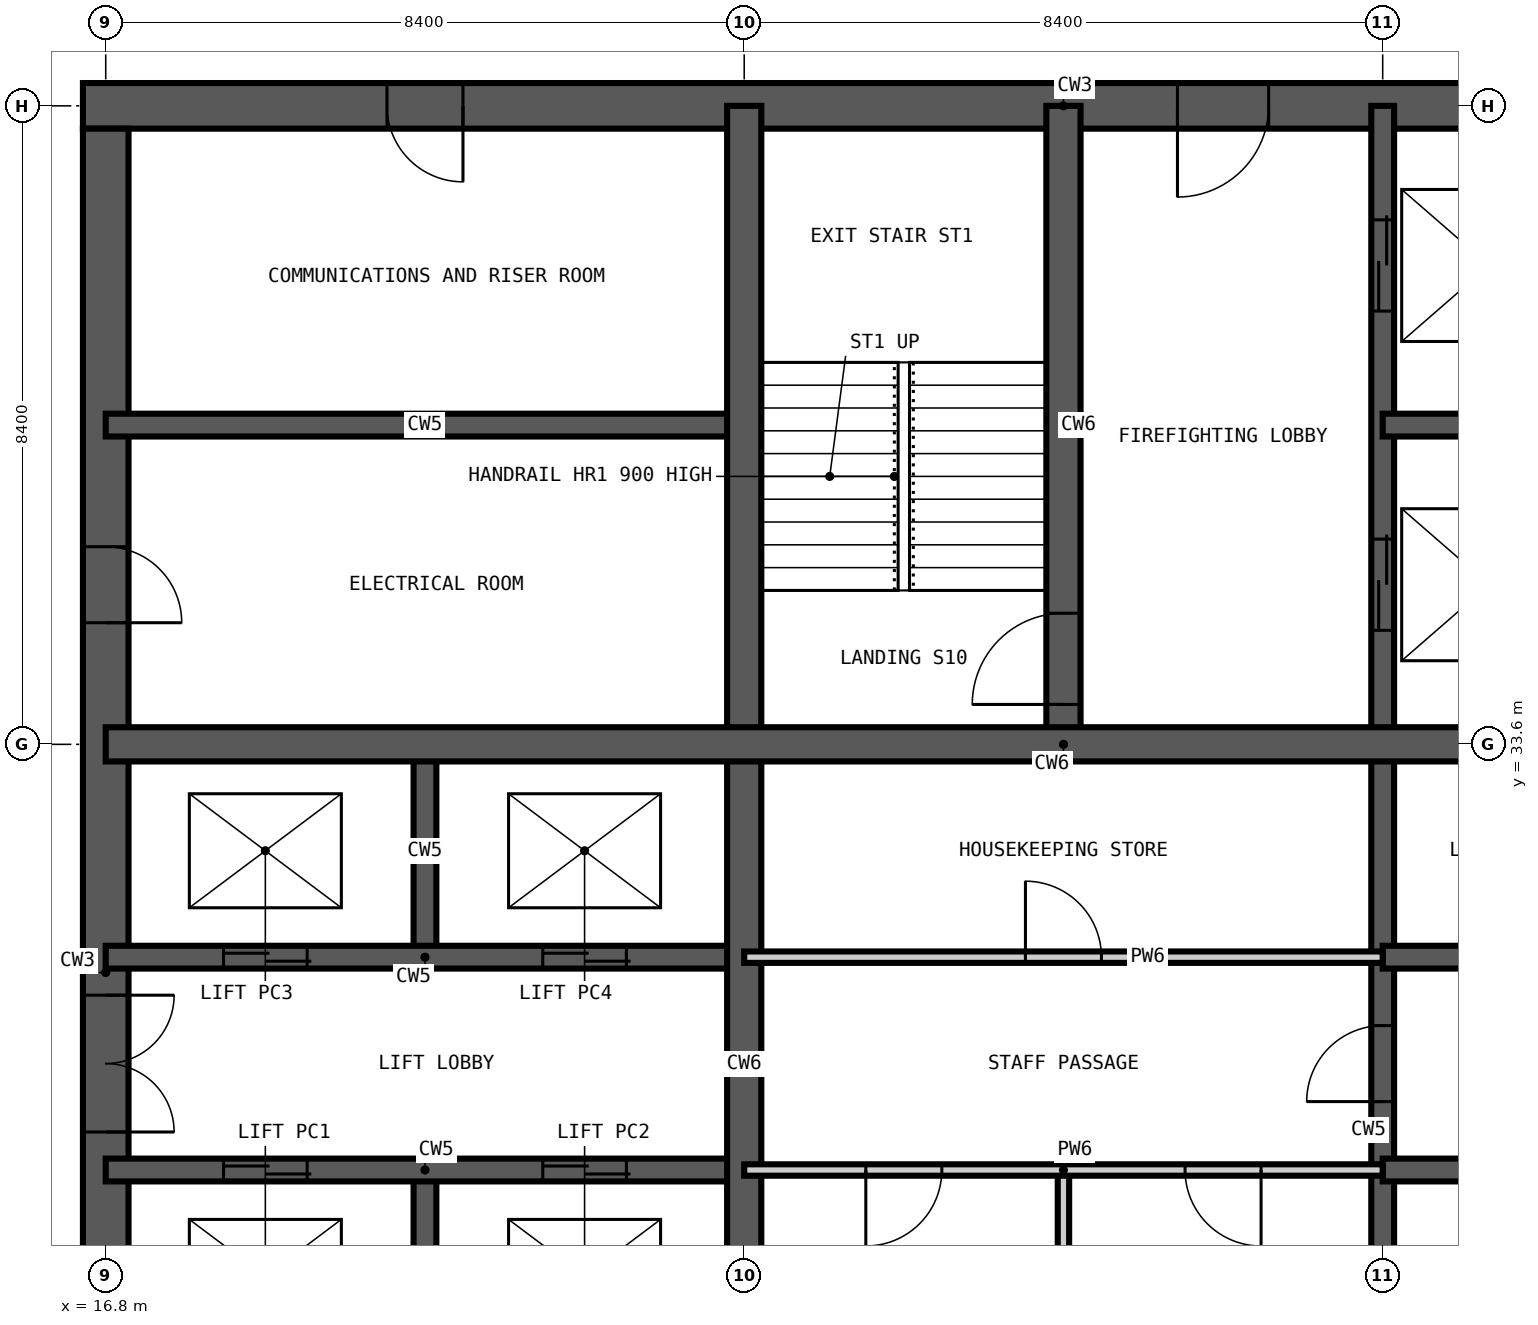
"""IFC4 building model, lengths in metres.
Left out: names, types, materials, properties, quantities, classifications, styles, units other than length and angle.
Written with IfcOpenShell. Run it as: python <this file> out.ifc"""

import sys

from ifc_helpers import new_model, si_unit, direction, frame, frame_2d, origin, place, context, subcontext, project, spatial, rectangle, extrude, element, fill, save


model = new_model("IFC4")
c1 = context("Model", 3, precision=1e-05, world=origin(), true_north=direction((0.0, 1.0)))
c2 = subcontext(c1, "Body", "Model", "MODEL_VIEW")
j1 = project(units=[si_unit("LENGTHUNIT", "METRE"), si_unit("PLANEANGLEUNIT", "RADIAN")], contexts=[c1])
p1 = place(None, origin())
s1 = spatial("IfcSite", under=j1, at=p1, CompositionType="ELEMENT")
p2 = place(p1, origin())
s2 = spatial("IfcBuilding", under=s1, at=p2, CompositionType="ELEMENT")
p3 = place(p2, frame((0.0, 0.0, 180.6)))
s3 = spatial("IfcBuildingStorey", under=s2, at=p3, CompositionType="ELEMENT", Elevation=180.6)
p4 = place(p3, frame((42.3, 42.0, -0.35), z_axis=(0.0, 0.0, 1.0), x_axis=(-1.0, 0.0, 0.0)))
e1 = element("IfcWall", 1, at=p4, inside=s3, PredefinedType="SHEAR", context=c2, shape_type="SweptSolid", body=[
    extrude(rectangle(XDim=25.8, YDim=0.6, at=frame_2d((12.9, 0.0))), origin(), (0.0, 0.0, 1.0), 3.6),
])
p5 = place(p4, frame((20.8, 0.0, 0.35)))
e2 = element("IfcOpeningElement", 2, at=p5, cuts=e1, PredefinedType="OPENING", context=c2, shape_type="SweptSolid", body=[
    extrude(rectangle(XDim=1.0, YDim=2.1, at=frame_2d((0.5, 1.05))), frame((0.0, 0.31, 0.0), z_axis=(0.0, -1.0, 0.0), x_axis=(1.0, 0.0, 0.0)), (0.0, 0.0, 1.0), 0.62),
])
p6 = place(p4, frame((10.2, 0.0, 0.35)))
e3 = element("IfcOpeningElement", 3, at=p6, cuts=e1, PredefinedType="OPENING", context=c2, shape_type="SweptSolid", body=[
    extrude(rectangle(XDim=1.2, YDim=2.2, at=frame_2d((0.6, 1.1))), frame((0.0, 0.31, 0.0), z_axis=(0.0, -1.0, 0.0), x_axis=(1.0, 0.0, 0.0)), (0.0, 0.0, 1.0), 0.62),
])
p7 = place(p3, frame((16.8, 41.7, -0.35), z_axis=(0.0, 0.0, 1.0), x_axis=(0.0, -1.0, 0.0)))
e4 = element("IfcWall", 4, at=p7, inside=s3, PredefinedType="SHEAR", context=c2, shape_type="SweptSolid", body=[
    extrude(rectangle(XDim=24.6, YDim=0.6, at=frame_2d((12.3, 0.0))), origin(), (0.0, 0.0, 1.0), 3.6),
])
p8 = place(p7, frame((11.4, 0.0, 0.35)))
e5 = element("IfcOpeningElement", 5, at=p8, cuts=e4, PredefinedType="OPENING", context=c2, shape_type="SweptSolid", body=[
    extrude(rectangle(XDim=1.8, YDim=2.2, at=frame_2d((0.9, 1.1))), frame((0.0, 0.31, 0.0), z_axis=(0.0, -1.0, 0.0), x_axis=(1.0, 0.0, 0.0)), (0.0, 0.0, 1.0), 0.62),
])
p9 = place(p7, frame((20.2, 0.0, 0.35)))
e6 = element("IfcOpeningElement", 6, at=p9, cuts=e4, PredefinedType="OPENING", context=c2, shape_type="SweptSolid", body=[
    extrude(rectangle(XDim=1.0, YDim=2.1, at=frame_2d((0.5, 1.05))), frame((0.0, 0.31, 0.0), z_axis=(0.0, -1.0, 0.0), x_axis=(1.0, 0.0, 0.0)), (0.0, 0.0, 1.0), 0.62),
])
p10 = place(p7, frame((5.5, 0.0, 0.35)))
e7 = element("IfcOpeningElement", 7, at=p10, cuts=e4, PredefinedType="OPENING", context=c2, shape_type="SweptSolid", body=[
    extrude(rectangle(XDim=1.0, YDim=2.1, at=frame_2d((0.5, 1.05))), frame((0.0, 0.31, 0.0), z_axis=(0.0, -1.0, 0.0), x_axis=(1.0, 0.0, 0.0)), (0.0, 0.0, 1.0), 0.62),
])
p11 = place(p3, frame((21.0, 22.4, -0.35), z_axis=(0.0, 0.0, 1.0), x_axis=(0.0, 1.0, 0.0)))
e8 = element("IfcWall", 8, at=p11, inside=s3, PredefinedType="SHEAR", context=c2, shape_type="SweptSolid", body=[
    extrude(rectangle(XDim=5.6, YDim=0.3, at=frame_2d((2.8, 0.0))), origin(), (0.0, 0.0, 1.0), 3.6),
])
p12 = place(p3, frame((21.0, 30.8, -0.35), z_axis=(0.0, 0.0, 1.0), x_axis=(0.0, 1.0, 0.0)))
e9 = element("IfcWall", 9, at=p12, inside=s3, PredefinedType="SHEAR", context=c2, shape_type="SweptSolid", body=[
    extrude(rectangle(XDim=2.8, YDim=0.3, at=frame_2d((1.4, 0.0))), origin(), (0.0, 0.0, 1.0), 3.6),
])
p13 = place(p3, frame((33.6, 16.8, -0.35), z_axis=(0.0, 0.0, 1.0), x_axis=(0.0, 1.0, 0.0)))
e10 = element("IfcWall", 10, at=p13, inside=s3, PredefinedType="SHEAR", context=c2, shape_type="SweptSolid", body=[
    extrude(rectangle(XDim=25.2, YDim=0.3, at=frame_2d((12.6, 0.0))), origin(), (0.0, 0.0, 1.0), 3.6),
])
p14 = place(p13, frame((22.5, 0.0, 0.35)))
e11 = element("IfcOpeningElement", 11, at=p14, cuts=e10, PredefinedType="OPENING", context=c2, shape_type="SweptSolid", body=[
    extrude(rectangle(XDim=1.2, YDim=2.2, at=frame_2d((0.6, 1.1))), frame((0.0, 0.16, 0.0), z_axis=(0.0, -1.0, 0.0), x_axis=(1.0, 0.0, 0.0)), (0.0, 0.0, 1.0), 0.32),
])
p15 = place(p13, frame((18.3, 0.0, 0.35)))
e12 = element("IfcOpeningElement", 12, at=p15, cuts=e10, PredefinedType="OPENING", context=c2, shape_type="SweptSolid", body=[
    extrude(rectangle(XDim=1.2, YDim=2.2, at=frame_2d((0.6, 1.1))), frame((0.0, 0.16, 0.0), z_axis=(0.0, -1.0, 0.0), x_axis=(1.0, 0.0, 0.0)), (0.0, 0.0, 1.0), 0.32),
])
p16 = place(p13, frame((12.1, 0.0, 0.35)))
e13 = element("IfcOpeningElement", 13, at=p16, cuts=e10, PredefinedType="OPENING", context=c2, shape_type="SweptSolid", body=[
    extrude(rectangle(XDim=1.0, YDim=2.1, at=frame_2d((0.5, 1.05))), frame((0.0, 0.16, 0.0), z_axis=(0.0, -1.0, 0.0), x_axis=(1.0, 0.0, 0.0)), (0.0, 0.0, 1.0), 0.32),
])
p17 = place(p3, frame((16.8, 28.0, -0.35), z_axis=(0.0, 0.0, 1.0), x_axis=(1.0, 0.0, 0.0)))
e14 = element("IfcWall", 14, at=p17, inside=s3, PredefinedType="SHEAR", context=c2, shape_type="SweptSolid", body=[
    extrude(rectangle(XDim=8.4, YDim=0.3, at=frame_2d((4.2, 0.0))), origin(), (0.0, 0.0, 1.0), 3.6),
])
p18 = place(p17, frame((1.55, 0.0, 0.35)))
e15 = element("IfcOpeningElement", 15, at=p18, cuts=e14, PredefinedType="OPENING", context=c2, shape_type="SweptSolid", body=[
    extrude(rectangle(XDim=1.1, YDim=2.2, at=frame_2d((0.55, 1.1))), frame((0.0, 0.16, 0.0), z_axis=(0.0, -1.0, 0.0), x_axis=(1.0, 0.0, 0.0)), (0.0, 0.0, 1.0), 0.32),
])
p19 = place(p17, frame((5.75, 0.0, 0.35)))
e16 = element("IfcOpeningElement", 16, at=p19, cuts=e14, PredefinedType="OPENING", context=c2, shape_type="SweptSolid", body=[
    extrude(rectangle(XDim=1.1, YDim=2.2, at=frame_2d((0.55, 1.1))), frame((0.0, 0.16, 0.0), z_axis=(0.0, -1.0, 0.0), x_axis=(1.0, 0.0, 0.0)), (0.0, 0.0, 1.0), 0.32),
])
p20 = place(p3, frame((33.6, 28.0, -0.35), z_axis=(0.0, 0.0, 1.0), x_axis=(1.0, 0.0, 0.0)))
e17 = element("IfcWall", 17, at=p20, inside=s3, PredefinedType="SHEAR", context=c2, shape_type="SweptSolid", body=[
    extrude(rectangle(XDim=8.4, YDim=0.3, at=frame_2d((4.2, 0.0))), origin(), (0.0, 0.0, 1.0), 3.6),
])
p21 = place(p20, frame((1.6, 0.0, 0.35)))
e18 = element("IfcOpeningElement", 18, at=p21, cuts=e17, PredefinedType="OPENING", context=c2, shape_type="SweptSolid", body=[
    extrude(rectangle(XDim=1.0, YDim=2.1, at=frame_2d((0.5, 1.05))), frame((0.0, 0.16, 0.0), z_axis=(0.0, -1.0, 0.0), x_axis=(1.0, 0.0, 0.0)), (0.0, 0.0, 1.0), 0.32),
])
p22 = place(p20, frame((4.6, 0.0, 0.35)))
e19 = element("IfcOpeningElement", 19, at=p22, cuts=e17, PredefinedType="OPENING", context=c2, shape_type="SweptSolid", body=[
    extrude(rectangle(XDim=1.0, YDim=2.1, at=frame_2d((0.5, 1.05))), frame((0.0, 0.16, 0.0), z_axis=(0.0, -1.0, 0.0), x_axis=(1.0, 0.0, 0.0)), (0.0, 0.0, 1.0), 0.32),
])
p23 = place(p3, frame((16.8, 30.8, -0.35), z_axis=(0.0, 0.0, 1.0), x_axis=(1.0, 0.0, 0.0)))
e20 = element("IfcWall", 20, at=p23, inside=s3, PredefinedType="SHEAR", context=c2, shape_type="SweptSolid", body=[
    extrude(rectangle(XDim=8.4, YDim=0.3, at=frame_2d((4.2, 0.0))), origin(), (0.0, 0.0, 1.0), 3.6),
])
p24 = place(p23, frame((1.55, 0.0, 0.35)))
e21 = element("IfcOpeningElement", 21, at=p24, cuts=e20, PredefinedType="OPENING", context=c2, shape_type="SweptSolid", body=[
    extrude(rectangle(XDim=1.1, YDim=2.2, at=frame_2d((0.55, 1.1))), frame((0.0, 0.16, 0.0), z_axis=(0.0, -1.0, 0.0), x_axis=(1.0, 0.0, 0.0)), (0.0, 0.0, 1.0), 0.32),
])
p25 = place(p23, frame((5.75, 0.0, 0.35)))
e22 = element("IfcOpeningElement", 22, at=p25, cuts=e20, PredefinedType="OPENING", context=c2, shape_type="SweptSolid", body=[
    extrude(rectangle(XDim=1.1, YDim=2.2, at=frame_2d((0.55, 1.1))), frame((0.0, 0.16, 0.0), z_axis=(0.0, -1.0, 0.0), x_axis=(1.0, 0.0, 0.0)), (0.0, 0.0, 1.0), 0.32),
])
for number, where, z_axis, x_axis in (
    (23, (33.6, 30.8, -0.35), (0.0, 0.0, 1.0), (1.0, 0.0, 0.0)),
    (24, (16.8, 37.8, -0.35), (0.0, 0.0, 1.0), (1.0, 0.0, 0.0)),
):
    element("IfcWall", number, at=place(p3, frame(where, z_axis=z_axis, x_axis=x_axis)), inside=s3, PredefinedType="SHEAR", context=c2, shape_type="SweptSolid", body=[
        extrude(rectangle(XDim=8.4, YDim=0.3, at=frame_2d((4.2, 0.0))), origin(), (0.0, 0.0, 1.0), 3.6),
    ])
p26 = place(p3, frame((33.6, 37.8, -0.35), z_axis=(0.0, 0.0, 1.0), x_axis=(1.0, 0.0, 0.0)))
e25 = element("IfcWall", 25, at=p26, inside=s3, PredefinedType="SHEAR", context=c2, shape_type="SweptSolid", body=[
    extrude(rectangle(XDim=2.8, YDim=0.3, at=frame_2d((1.4, 0.0))), origin(), (0.0, 0.0, 1.0), 3.6),
])
p27 = place(p3, frame((25.2, 16.8, -0.35), z_axis=(0.0, 0.0, 1.0), x_axis=(0.0, 1.0, 0.0)))
e26 = element("IfcWall", 26, at=p27, inside=s3, PredefinedType="SHEAR", context=c2, shape_type="SweptSolid", body=[
    extrude(rectangle(XDim=25.2, YDim=0.45, at=frame_2d((12.6, 0.0))), origin(), (0.0, 0.0, 1.0), 3.6),
])
p28 = place(p3, frame((29.4, 33.6, -0.35), z_axis=(0.0, 0.0, 1.0), x_axis=(0.0, 1.0, 0.0)))
e27 = element("IfcWall", 27, at=p28, inside=s3, PredefinedType="SHEAR", context=c2, shape_type="SweptSolid", body=[
    extrude(rectangle(XDim=8.4, YDim=0.45, at=frame_2d((4.2, 0.0))), origin(), (0.0, 0.0, 1.0), 3.6),
])
p29 = place(p28, frame((0.525, 0.0, 0.35)))
e28 = element("IfcOpeningElement", 28, at=p29, cuts=e27, PredefinedType="OPENING", context=c2, shape_type="SweptSolid", body=[
    extrude(rectangle(XDim=1.2, YDim=2.2, at=frame_2d((0.6, 1.1))), frame((0.0, 0.235, 0.0), z_axis=(0.0, -1.0, 0.0), x_axis=(1.0, 0.0, 0.0)), (0.0, 0.0, 1.0), 0.47),
])
p30 = place(p3, frame((16.8, 33.6, -0.35), z_axis=(0.0, 0.0, 1.0), x_axis=(1.0, 0.0, 0.0)))
e29 = element("IfcWall", 29, at=p30, inside=s3, PredefinedType="SHEAR", context=c2, shape_type="SweptSolid", body=[
    extrude(rectangle(XDim=25.2, YDim=0.45, at=frame_2d((12.6, 0.0))), origin(), (0.0, 0.0, 1.0), 3.6),
])
p31 = place(p3, frame((29.4, 25.2, 0.0), z_axis=(0.0, 0.0, 1.0), x_axis=(0.0, 1.0, 0.0)))
e30 = element("IfcWall", 30, at=p31, inside=s3, PredefinedType="PARTITIONING", context=c2, shape_type="SweptSolid", body=[
    extrude(rectangle(XDim=2.8, YDim=0.15, at=frame_2d((1.4, 0.0))), origin(), (0.0, 0.0, 1.0), 3.25),
])
p32 = place(p3, frame((25.2, 28.0, 0.0), z_axis=(0.0, 0.0, 1.0), x_axis=(1.0, 0.0, 0.0)))
e31 = element("IfcWall", 31, at=p32, inside=s3, PredefinedType="PARTITIONING", context=c2, shape_type="SweptSolid", body=[
    extrude(rectangle(XDim=8.4, YDim=0.15, at=frame_2d((4.2, 0.0))), origin(), (0.0, 0.0, 1.0), 3.25),
])
p33 = place(p32, frame((5.8, 0.0, 0.0)))
e32 = element("IfcOpeningElement", 32, at=p33, cuts=e31, PredefinedType="OPENING", context=c2, shape_type="SweptSolid", body=[
    extrude(rectangle(XDim=1.0, YDim=2.1, at=frame_2d((0.5, 1.05))), frame((0.0, 0.085, 0.0), z_axis=(0.0, -1.0, 0.0), x_axis=(1.0, 0.0, 0.0)), (0.0, 0.0, 1.0), 0.17),
])
p34 = place(p32, frame((1.6, 0.0, 0.0)))
e33 = element("IfcOpeningElement", 33, at=p34, cuts=e31, PredefinedType="OPENING", context=c2, shape_type="SweptSolid", body=[
    extrude(rectangle(XDim=1.0, YDim=2.1, at=frame_2d((0.5, 1.05))), frame((0.0, 0.085, 0.0), z_axis=(0.0, -1.0, 0.0), x_axis=(1.0, 0.0, 0.0)), (0.0, 0.0, 1.0), 0.17),
])
p35 = place(p3, frame((25.2, 30.8, 0.0), z_axis=(0.0, 0.0, 1.0), x_axis=(1.0, 0.0, 0.0)))
e34 = element("IfcWall", 34, at=p35, inside=s3, PredefinedType="PARTITIONING", context=c2, shape_type="SweptSolid", body=[
    extrude(rectangle(XDim=8.4, YDim=0.15, at=frame_2d((4.2, 0.0))), origin(), (0.0, 0.0, 1.0), 3.25),
])
p36 = place(p35, frame((3.7, 0.0, 0.0)))
e35 = element("IfcOpeningElement", 35, at=p36, cuts=e34, PredefinedType="OPENING", context=c2, shape_type="SweptSolid", body=[
    extrude(rectangle(XDim=1.0, YDim=2.1, at=frame_2d((0.5, 1.05))), frame((0.0, 0.085, 0.0), z_axis=(0.0, -1.0, 0.0), x_axis=(1.0, 0.0, 0.0)), (0.0, 0.0, 1.0), 0.17),
])
p37 = place(p29, origin())
e36 = element("IfcDoor", 36, at=p37, inside=s3, OperationType="SINGLE_SWING_LEFT", PredefinedType="DOOR", context=c2, shape_type="SweptSolid", body=[
    extrude(rectangle(XDim=1.2, YDim=2.2, at=frame_2d((0.6, 1.1))), frame((0.0, 0.025, 0.0), z_axis=(0.0, -1.0, 0.0), x_axis=(1.0, 0.0, 0.0)), (0.0, 0.0, 1.0), 0.05),
])
fill(e28, e36)
p38 = place(p18, origin())
e37 = element("IfcDoor", 37, at=p38, inside=s3, OperationType="DOUBLE_DOOR_SLIDING", PredefinedType="DOOR", context=c2, shape_type="SweptSolid", body=[
    extrude(rectangle(XDim=1.1, YDim=2.2, at=frame_2d((0.55, 1.1))), frame((0.0, 0.025, 0.0), z_axis=(0.0, -1.0, 0.0), x_axis=(1.0, 0.0, 0.0)), (0.0, 0.0, 1.0), 0.05),
])
fill(e15, e37)
p39 = place(p19, origin())
e38 = element("IfcDoor", 38, at=p39, inside=s3, OperationType="DOUBLE_DOOR_SLIDING", PredefinedType="DOOR", context=c2, shape_type="SweptSolid", body=[
    extrude(rectangle(XDim=1.1, YDim=2.2, at=frame_2d((0.55, 1.1))), frame((0.0, 0.025, 0.0), z_axis=(0.0, -1.0, 0.0), x_axis=(1.0, 0.0, 0.0)), (0.0, 0.0, 1.0), 0.05),
])
fill(e16, e38)
p40 = place(p24, origin())
e39 = element("IfcDoor", 39, at=p40, inside=s3, OperationType="DOUBLE_DOOR_SLIDING", PredefinedType="DOOR", context=c2, shape_type="SweptSolid", body=[
    extrude(rectangle(XDim=1.1, YDim=2.2, at=frame_2d((0.55, 1.1))), frame((0.0, 0.025, 0.0), z_axis=(0.0, -1.0, 0.0), x_axis=(1.0, 0.0, 0.0)), (0.0, 0.0, 1.0), 0.05),
])
fill(e21, e39)
p41 = place(p25, origin())
e40 = element("IfcDoor", 40, at=p41, inside=s3, OperationType="DOUBLE_DOOR_SLIDING", PredefinedType="DOOR", context=c2, shape_type="SweptSolid", body=[
    extrude(rectangle(XDim=1.1, YDim=2.2, at=frame_2d((0.55, 1.1))), frame((0.0, 0.025, 0.0), z_axis=(0.0, -1.0, 0.0), x_axis=(1.0, 0.0, 0.0)), (0.0, 0.0, 1.0), 0.05),
])
fill(e22, e40)
p42 = place(p14, origin())
e41 = element("IfcDoor", 41, at=p42, inside=s3, OperationType="DOUBLE_DOOR_SLIDING", PredefinedType="DOOR", context=c2, shape_type="SweptSolid", body=[
    extrude(rectangle(XDim=1.2, YDim=2.2, at=frame_2d((0.6, 1.1))), frame((0.0, 0.025, 0.0), z_axis=(0.0, -1.0, 0.0), x_axis=(1.0, 0.0, 0.0)), (0.0, 0.0, 1.0), 0.05),
])
fill(e11, e41)
p43 = place(p15, origin())
e42 = element("IfcDoor", 42, at=p43, inside=s3, OperationType="DOUBLE_DOOR_SLIDING", PredefinedType="DOOR", context=c2, shape_type="SweptSolid", body=[
    extrude(rectangle(XDim=1.2, YDim=2.2, at=frame_2d((0.6, 1.1))), frame((0.0, 0.025, 0.0), z_axis=(0.0, -1.0, 0.0), x_axis=(1.0, 0.0, 0.0)), (0.0, 0.0, 1.0), 0.05),
])
fill(e12, e42)
p44 = place(p8, origin())
e43 = element("IfcDoor", 43, at=p44, inside=s3, OperationType="DOUBLE_DOOR_DOUBLE_SWING", PredefinedType="DOOR", context=c2, shape_type="SweptSolid", body=[
    extrude(rectangle(XDim=1.8, YDim=2.2, at=frame_2d((0.9, 1.1))), frame((0.0, 0.025, 0.0), z_axis=(0.0, -1.0, 0.0), x_axis=(1.0, 0.0, 0.0)), (0.0, 0.0, 1.0), 0.05),
])
fill(e5, e43)
p45 = place(p10, origin())
e44 = element("IfcDoor", 44, at=p45, inside=s3, OperationType="SINGLE_SWING_RIGHT", PredefinedType="DOOR", context=c2, shape_type="SweptSolid", body=[
    extrude(rectangle(XDim=1.0, YDim=2.1, at=frame_2d((0.5, 1.05))), frame((0.0, 0.025, 0.0), z_axis=(0.0, -1.0, 0.0), x_axis=(1.0, 0.0, 0.0)), (0.0, 0.0, 1.0), 0.05),
])
fill(e7, e44)
p46 = place(p5, origin())
e45 = element("IfcDoor", 45, at=p46, inside=s3, OperationType="SINGLE_SWING_LEFT", PredefinedType="DOOR", context=c2, shape_type="SweptSolid", body=[
    extrude(rectangle(XDim=1.0, YDim=2.1, at=frame_2d((0.5, 1.05))), frame((0.0, 0.025, 0.0), z_axis=(0.0, -1.0, 0.0), x_axis=(1.0, 0.0, 0.0)), (0.0, 0.0, 1.0), 0.05),
])
fill(e2, e45)
p47 = place(p16, origin())
e46 = element("IfcDoor", 46, at=p47, inside=s3, OperationType="SINGLE_SWING_LEFT", PredefinedType="DOOR", context=c2, shape_type="SweptSolid", body=[
    extrude(rectangle(XDim=1.0, YDim=2.1, at=frame_2d((0.5, 1.05))), frame((0.0, 0.025, 0.0), z_axis=(0.0, -1.0, 0.0), x_axis=(1.0, 0.0, 0.0)), (0.0, 0.0, 1.0), 0.05),
])
fill(e13, e46)
p48 = place(p33, frame((1.0, 0.0, 0.0), z_axis=(0.0, 0.0, 1.0), x_axis=(-1.0, 0.0, 0.0)))
e47 = element("IfcDoor", 47, at=p48, inside=s3, OperationType="SINGLE_SWING_LEFT", PredefinedType="DOOR", context=c2, shape_type="SweptSolid", body=[
    extrude(rectangle(XDim=1.0, YDim=2.1, at=frame_2d((0.5, 1.05))), frame((0.0, 0.025, 0.0), z_axis=(0.0, -1.0, 0.0), x_axis=(1.0, 0.0, 0.0)), (0.0, 0.0, 1.0), 0.05),
])
fill(e32, e47)
p49 = place(p34, frame((1.0, 0.0, 0.0), z_axis=(0.0, 0.0, 1.0), x_axis=(-1.0, 0.0, 0.0)))
e48 = element("IfcDoor", 48, at=p49, inside=s3, OperationType="SINGLE_SWING_RIGHT", PredefinedType="DOOR", context=c2, shape_type="SweptSolid", body=[
    extrude(rectangle(XDim=1.0, YDim=2.1, at=frame_2d((0.5, 1.05))), frame((0.0, 0.025, 0.0), z_axis=(0.0, -1.0, 0.0), x_axis=(1.0, 0.0, 0.0)), (0.0, 0.0, 1.0), 0.05),
])
fill(e33, e48)
p50 = place(p36, origin())
e49 = element("IfcDoor", 49, at=p50, inside=s3, OperationType="SINGLE_SWING_LEFT", PredefinedType="DOOR", context=c2, shape_type="SweptSolid", body=[
    extrude(rectangle(XDim=1.0, YDim=2.1, at=frame_2d((0.5, 1.05))), frame((0.0, 0.025, 0.0), z_axis=(0.0, -1.0, 0.0), x_axis=(1.0, 0.0, 0.0)), (0.0, 0.0, 1.0), 0.05),
])
fill(e35, e49)
p51 = place(p6, origin())
e50 = element("IfcDoor", 50, at=p51, inside=s3, OperationType="SINGLE_SWING_RIGHT", PredefinedType="DOOR", context=c2, shape_type="SweptSolid", body=[
    extrude(rectangle(XDim=1.2, YDim=2.2, at=frame_2d((0.6, 1.1))), frame((0.0, 0.025, 0.0), z_axis=(0.0, -1.0, 0.0), x_axis=(1.0, 0.0, 0.0)), (0.0, 0.0, 1.0), 0.05),
])
fill(e3, e50)
save(model, sys.argv[1])
